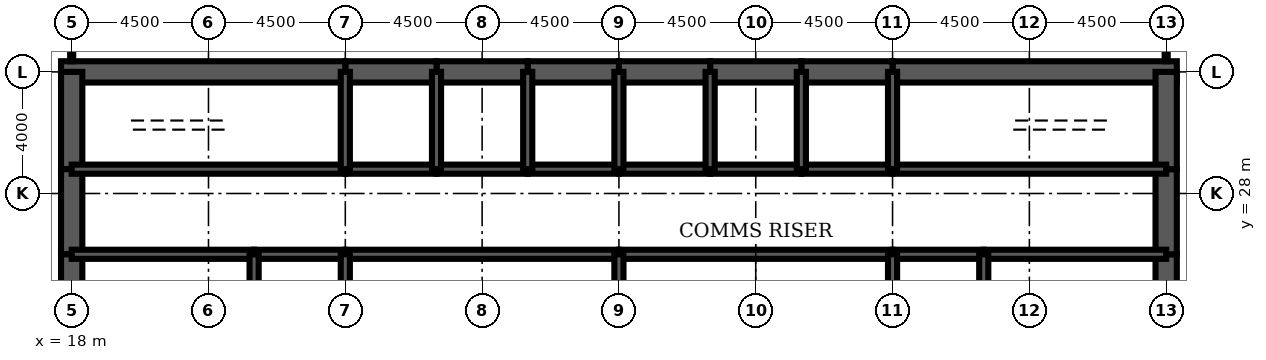
"""IFC4 building model, lengths in metres.
Left out: names, types, materials, properties, quantities, classifications, styles, units other than length and angle.
Written with IfcOpenShell. Run it as: python <this file> out.ifc"""

import sys

from ifc_helpers import new_model, si_unit, direction, frame, frame_2d, origin, place, context, subcontext, project, spatial, rectangle, extrude, element, fill, save


model = new_model("IFC4")
c1 = context("Model", 3, precision=1e-05, world=origin(), true_north=direction((0.0, 1.0)))
c2 = subcontext(c1, "Body", "Model", "MODEL_VIEW")
j1 = project(units=[si_unit("LENGTHUNIT", "METRE"), si_unit("PLANEANGLEUNIT", "RADIAN")], contexts=[c1])
p1 = place(None, origin())
s1 = spatial("IfcSite", under=j1, at=p1, CompositionType="ELEMENT")
p2 = place(p1, origin())
s2 = spatial("IfcBuilding", under=s1, at=p2, CompositionType="ELEMENT")
p3 = place(p2, frame((0.0, 0.0, 317.3)))
s3 = spatial("IfcBuildingStorey", under=s2, at=p3, CompositionType="ELEMENT", Elevation=317.3)
p4 = place(p3, frame((54.35, 32.0, 0.0), z_axis=(0.0, 0.0, 1.0), x_axis=(-1.0, 0.0, 0.0)))
e1 = element("IfcWall", 1, at=p4, inside=s3, PredefinedType="SHEAR", context=c2, shape_type="SweptSolid", body=[
    extrude(rectangle(XDim=9.35, YDim=0.7, at=frame_2d((4.675, 0.0))), origin(), (0.0, 0.0, 1.0), 4.2),
])
for number, where, z_axis, x_axis in (
    (2, (45.0, 32.0, 0.0), (0.0, 0.0, 1.0), (-1.0, 0.0, 0.0)),
    (3, (42.0, 32.0, 0.0), (0.0, 0.0, 1.0), (-1.0, 0.0, 0.0)),
    (4, (39.0, 32.0, 0.0), (0.0, 0.0, 1.0), (-1.0, 0.0, 0.0)),
    (5, (36.0, 32.0, 0.0), (0.0, 0.0, 1.0), (-1.0, 0.0, 0.0)),
    (6, (33.0, 32.0, 0.0), (0.0, 0.0, 1.0), (-1.0, 0.0, 0.0)),
    (7, (30.0, 32.0, 0.0), (0.0, 0.0, 1.0), (-1.0, 0.0, 0.0)),
):
    element("IfcWall", number, at=place(p3, frame(where, z_axis=z_axis, x_axis=x_axis)), inside=s3, PredefinedType="SHEAR", context=c2, shape_type="SweptSolid", body=[
        extrude(rectangle(XDim=3.0, YDim=0.7, at=frame_2d((1.5, 0.0))), origin(), (0.0, 0.0, 1.0), 4.2),
    ])
p5 = place(p3, frame((27.0, 32.0, 0.0), z_axis=(0.0, 0.0, 1.0), x_axis=(-1.0, 0.0, 0.0)))
e8 = element("IfcWall", 8, at=p5, inside=s3, PredefinedType="SHEAR", context=c2, shape_type="SweptSolid", body=[
    extrude(rectangle(XDim=9.35, YDim=0.7, at=frame_2d((4.675, 0.0))), origin(), (0.0, 0.0, 1.0), 4.2),
])
p6 = place(p3, frame((18.0, 32.0, 0.0), z_axis=(0.0, 0.0, 1.0), x_axis=(0.0, -1.0, 0.0)))
e9 = element("IfcWall", 9, at=p6, inside=s3, PredefinedType="SHEAR", context=c2, shape_type="SweptSolid", body=[
    extrude(rectangle(XDim=3.2, YDim=0.7, at=frame_2d((1.6, 0.0))), origin(), (0.0, 0.0, 1.0), 4.2),
])
p7 = place(p3, frame((18.0, 28.8, 0.0), z_axis=(0.0, 0.0, 1.0), x_axis=(0.0, -1.0, 0.0)))
e10 = element("IfcWall", 10, at=p7, inside=s3, PredefinedType="SHEAR", context=c2, shape_type="SweptSolid", body=[
    extrude(rectangle(XDim=2.8, YDim=0.7, at=frame_2d((1.4, 0.0))), origin(), (0.0, 0.0, 1.0), 4.2),
])
p8 = place(p7, frame((0.4, 0.0, 0.0)))
e11 = element("IfcOpeningElement", 11, at=p8, cuts=e10, PredefinedType="OPENING", context=c2, shape_type="SweptSolid", body=[
    extrude(rectangle(XDim=1.8, YDim=2.1, at=frame_2d((0.9, 1.05))), frame((0.0, 0.36, 0.0), z_axis=(0.0, -1.0, 0.0), x_axis=(1.0, 0.0, 0.0)), (0.0, 0.0, 1.0), 0.72),
])
for number, where, z_axis, x_axis in (
    (12, (18.0, 26.0, 0.0), (0.0, 0.0, 1.0), (0.0, -1.0, 0.0)),
    (13, (54.0, 22.0, 0.0), (0.0, 0.0, 1.0), (0.0, 1.0, 0.0)),
):
    element("IfcWall", number, at=place(p3, frame(where, z_axis=z_axis, x_axis=x_axis)), inside=s3, PredefinedType="SHEAR", context=c2, shape_type="SweptSolid", body=[
        extrude(rectangle(XDim=4.0, YDim=0.7, at=frame_2d((2.0, 0.0))), origin(), (0.0, 0.0, 1.0), 4.2),
    ])
p9 = place(p3, frame((54.0, 26.0, 0.0), z_axis=(0.0, 0.0, 1.0), x_axis=(0.0, 1.0, 0.0)))
e14 = element("IfcWall", 14, at=p9, inside=s3, PredefinedType="SHEAR", context=c2, shape_type="SweptSolid", body=[
    extrude(rectangle(XDim=2.8, YDim=0.7, at=frame_2d((1.4, 0.0))), origin(), (0.0, 0.0, 1.0), 4.2),
])
p10 = place(p9, frame((0.6, 0.0, 0.0)))
e15 = element("IfcOpeningElement", 15, at=p10, cuts=e14, PredefinedType="OPENING", context=c2, shape_type="SweptSolid", body=[
    extrude(rectangle(XDim=1.8, YDim=2.1, at=frame_2d((0.9, 1.05))), frame((0.0, 0.36, 0.0), z_axis=(0.0, -1.0, 0.0), x_axis=(1.0, 0.0, 0.0)), (0.0, 0.0, 1.0), 0.72),
])
p11 = place(p3, frame((54.0, 28.8, 0.0), z_axis=(0.0, 0.0, 1.0), x_axis=(0.0, 1.0, 0.0)))
e16 = element("IfcWall", 16, at=p11, inside=s3, PredefinedType="SHEAR", context=c2, shape_type="SweptSolid", body=[
    extrude(rectangle(XDim=3.2, YDim=0.7, at=frame_2d((1.6, 0.0))), origin(), (0.0, 0.0, 1.0), 4.2),
])
p12 = place(p3, frame((18.0, 28.8, 0.0), z_axis=(0.0, 0.0, 1.0), x_axis=(1.0, 0.0, 0.0)))
e17 = element("IfcWall", 17, at=p12, inside=s3, PredefinedType="SOLIDWALL", context=c2, shape_type="SweptSolid", body=[
    extrude(rectangle(XDim=9.0, YDim=0.3, at=frame_2d((4.5, 0.0))), origin(), (0.0, 0.0, 1.0), 4.2),
])
p13 = place(p12, frame((0.65, 0.0, 0.0)))
e18 = element("IfcOpeningElement", 18, at=p13, cuts=e17, PredefinedType="OPENING", context=c2, shape_type="SweptSolid", body=[
    extrude(rectangle(XDim=1.0, YDim=2.1, at=frame_2d((0.5, 1.05))), frame((0.0, 0.16, 0.0), z_axis=(0.0, -1.0, 0.0), x_axis=(1.0, 0.0, 0.0)), (0.0, 0.0, 1.0), 0.32),
])
p14 = place(p3, frame((27.0, 28.8, 0.0), z_axis=(0.0, 0.0, 1.0), x_axis=(1.0, 0.0, 0.0)))
e19 = element("IfcWall", 19, at=p14, inside=s3, PredefinedType="SOLIDWALL", context=c2, shape_type="SweptSolid", body=[
    extrude(rectangle(XDim=3.0, YDim=0.3, at=frame_2d((1.5, 0.0))), origin(), (0.0, 0.0, 1.0), 4.2),
])
p15 = place(p14, frame((0.95, 0.0, 0.0)))
e20 = element("IfcOpeningElement", 20, at=p15, cuts=e19, PredefinedType="OPENING", context=c2, shape_type="SweptSolid", body=[
    extrude(rectangle(XDim=1.1, YDim=2.2, at=frame_2d((0.55, 1.1))), frame((0.0, 0.16, 0.0), z_axis=(0.0, -1.0, 0.0), x_axis=(1.0, 0.0, 0.0)), (0.0, 0.0, 1.0), 0.32),
])
p16 = place(p3, frame((30.0, 28.8, 0.0), z_axis=(0.0, 0.0, 1.0), x_axis=(1.0, 0.0, 0.0)))
e21 = element("IfcWall", 21, at=p16, inside=s3, PredefinedType="SOLIDWALL", context=c2, shape_type="SweptSolid", body=[
    extrude(rectangle(XDim=3.0, YDim=0.3, at=frame_2d((1.5, 0.0))), origin(), (0.0, 0.0, 1.0), 4.2),
])
p17 = place(p16, frame((0.95, 0.0, 0.0)))
e22 = element("IfcOpeningElement", 22, at=p17, cuts=e21, PredefinedType="OPENING", context=c2, shape_type="SweptSolid", body=[
    extrude(rectangle(XDim=1.1, YDim=2.2, at=frame_2d((0.55, 1.1))), frame((0.0, 0.16, 0.0), z_axis=(0.0, -1.0, 0.0), x_axis=(1.0, 0.0, 0.0)), (0.0, 0.0, 1.0), 0.32),
])
p18 = place(p3, frame((33.0, 28.8, 0.0), z_axis=(0.0, 0.0, 1.0), x_axis=(1.0, 0.0, 0.0)))
e23 = element("IfcWall", 23, at=p18, inside=s3, PredefinedType="SOLIDWALL", context=c2, shape_type="SweptSolid", body=[
    extrude(rectangle(XDim=3.0, YDim=0.3, at=frame_2d((1.5, 0.0))), origin(), (0.0, 0.0, 1.0), 4.2),
])
p19 = place(p18, frame((0.95, 0.0, 0.0)))
e24 = element("IfcOpeningElement", 24, at=p19, cuts=e23, PredefinedType="OPENING", context=c2, shape_type="SweptSolid", body=[
    extrude(rectangle(XDim=1.1, YDim=2.2, at=frame_2d((0.55, 1.1))), frame((0.0, 0.16, 0.0), z_axis=(0.0, -1.0, 0.0), x_axis=(1.0, 0.0, 0.0)), (0.0, 0.0, 1.0), 0.32),
])
p20 = place(p3, frame((36.0, 28.8, 0.0), z_axis=(0.0, 0.0, 1.0), x_axis=(1.0, 0.0, 0.0)))
e25 = element("IfcWall", 25, at=p20, inside=s3, PredefinedType="SOLIDWALL", context=c2, shape_type="SweptSolid", body=[
    extrude(rectangle(XDim=3.0, YDim=0.3, at=frame_2d((1.5, 0.0))), origin(), (0.0, 0.0, 1.0), 4.2),
])
p21 = place(p20, frame((1.0, 0.0, 0.0)))
e26 = element("IfcOpeningElement", 26, at=p21, cuts=e25, PredefinedType="OPENING", context=c2, shape_type="SweptSolid", body=[
    extrude(rectangle(XDim=1.0, YDim=2.1, at=frame_2d((0.5, 1.05))), frame((0.0, 0.16, 0.0), z_axis=(0.0, -1.0, 0.0), x_axis=(1.0, 0.0, 0.0)), (0.0, 0.0, 1.0), 0.32),
])
p22 = place(p3, frame((39.0, 28.8, 0.0), z_axis=(0.0, 0.0, 1.0), x_axis=(1.0, 0.0, 0.0)))
e27 = element("IfcWall", 27, at=p22, inside=s3, PredefinedType="SOLIDWALL", context=c2, shape_type="SweptSolid", body=[
    extrude(rectangle(XDim=3.0, YDim=0.3, at=frame_2d((1.5, 0.0))), origin(), (0.0, 0.0, 1.0), 4.2),
])
p23 = place(p22, frame((1.0, 0.0, 0.0)))
e28 = element("IfcOpeningElement", 28, at=p23, cuts=e27, PredefinedType="OPENING", context=c2, shape_type="SweptSolid", body=[
    extrude(rectangle(XDim=1.0, YDim=2.1, at=frame_2d((0.5, 1.05))), frame((0.0, 0.16, 0.0), z_axis=(0.0, -1.0, 0.0), x_axis=(1.0, 0.0, 0.0)), (0.0, 0.0, 1.0), 0.32),
])
p24 = place(p3, frame((42.0, 28.8, 0.0), z_axis=(0.0, 0.0, 1.0), x_axis=(1.0, 0.0, 0.0)))
e29 = element("IfcWall", 29, at=p24, inside=s3, PredefinedType="SOLIDWALL", context=c2, shape_type="SweptSolid", body=[
    extrude(rectangle(XDim=3.0, YDim=0.3, at=frame_2d((1.5, 0.0))), origin(), (0.0, 0.0, 1.0), 4.2),
])
p25 = place(p24, frame((0.95, 0.0, 0.0)))
e30 = element("IfcOpeningElement", 30, at=p25, cuts=e29, PredefinedType="OPENING", context=c2, shape_type="SweptSolid", body=[
    extrude(rectangle(XDim=1.1, YDim=2.2, at=frame_2d((0.55, 1.1))), frame((0.0, 0.16, 0.0), z_axis=(0.0, -1.0, 0.0), x_axis=(1.0, 0.0, 0.0)), (0.0, 0.0, 1.0), 0.32),
])
p26 = place(p3, frame((45.0, 28.8, 0.0), z_axis=(0.0, 0.0, 1.0), x_axis=(1.0, 0.0, 0.0)))
e31 = element("IfcWall", 31, at=p26, inside=s3, PredefinedType="SOLIDWALL", context=c2, shape_type="SweptSolid", body=[
    extrude(rectangle(XDim=9.0, YDim=0.3, at=frame_2d((4.5, 0.0))), origin(), (0.0, 0.0, 1.0), 4.2),
])
p27 = place(p26, frame((7.35, 0.0, 0.0)))
e32 = element("IfcOpeningElement", 32, at=p27, cuts=e31, PredefinedType="OPENING", context=c2, shape_type="SweptSolid", body=[
    extrude(rectangle(XDim=1.0, YDim=2.1, at=frame_2d((0.5, 1.05))), frame((0.0, 0.16, 0.0), z_axis=(0.0, -1.0, 0.0), x_axis=(1.0, 0.0, 0.0)), (0.0, 0.0, 1.0), 0.32),
])
p28 = place(p3, frame((18.0, 26.0, 0.0), z_axis=(0.0, 0.0, 1.0), x_axis=(1.0, 0.0, 0.0)))
e33 = element("IfcWall", 33, at=p28, inside=s3, PredefinedType="SOLIDWALL", context=c2, shape_type="SweptSolid", body=[
    extrude(rectangle(XDim=6.0, YDim=0.3, at=frame_2d((3.0, 0.0))), origin(), (0.0, 0.0, 1.0), 4.2),
])
p29 = place(p3, frame((24.0, 26.0, 0.0), z_axis=(0.0, 0.0, 1.0), x_axis=(1.0, 0.0, 0.0)))
e34 = element("IfcWall", 34, at=p29, inside=s3, PredefinedType="SOLIDWALL", context=c2, shape_type="SweptSolid", body=[
    extrude(rectangle(XDim=3.0, YDim=0.3, at=frame_2d((1.5, 0.0))), origin(), (0.0, 0.0, 1.0), 4.2),
])
for number, where, z_axis, x_axis in (
    (35, (27.0, 26.0, 0.0), (0.0, 0.0, 1.0), (1.0, 0.0, 0.0)),
    (36, (36.0, 26.0, 0.0), (0.0, 0.0, 1.0), (1.0, 0.0, 0.0)),
):
    element("IfcWall", number, at=place(p3, frame(where, z_axis=z_axis, x_axis=x_axis)), inside=s3, PredefinedType="SOLIDWALL", context=c2, shape_type="SweptSolid", body=[
        extrude(rectangle(XDim=9.0, YDim=0.3, at=frame_2d((4.5, 0.0))), origin(), (0.0, 0.0, 1.0), 4.2),
    ])
p30 = place(p3, frame((45.0, 26.0, 0.0), z_axis=(0.0, 0.0, 1.0), x_axis=(1.0, 0.0, 0.0)))
e37 = element("IfcWall", 37, at=p30, inside=s3, PredefinedType="SOLIDWALL", context=c2, shape_type="SweptSolid", body=[
    extrude(rectangle(XDim=3.0, YDim=0.3, at=frame_2d((1.5, 0.0))), origin(), (0.0, 0.0, 1.0), 4.2),
])
p31 = place(p3, frame((48.0, 26.0, 0.0), z_axis=(0.0, 0.0, 1.0), x_axis=(1.0, 0.0, 0.0)))
e38 = element("IfcWall", 38, at=p31, inside=s3, PredefinedType="SOLIDWALL", context=c2, shape_type="SweptSolid", body=[
    extrude(rectangle(XDim=6.0, YDim=0.3, at=frame_2d((3.0, 0.0))), origin(), (0.0, 0.0, 1.0), 4.2),
])
for number, where, z_axis, x_axis in (
    (39, (27.0, 28.8, 0.0), (0.0, 0.0, 1.0), (0.0, 1.0, 0.0)),
    (40, (30.0, 28.8, 0.0), (0.0, 0.0, 1.0), (0.0, 1.0, 0.0)),
    (41, (33.0, 28.8, 0.0), (0.0, 0.0, 1.0), (0.0, 1.0, 0.0)),
    (42, (36.0, 28.8, 0.0), (0.0, 0.0, 1.0), (0.0, 1.0, 0.0)),
    (43, (39.0, 28.8, 0.0), (0.0, 0.0, 1.0), (0.0, 1.0, 0.0)),
    (44, (42.0, 28.8, 0.0), (0.0, 0.0, 1.0), (0.0, 1.0, 0.0)),
    (45, (45.0, 28.8, 0.0), (0.0, 0.0, 1.0), (0.0, 1.0, 0.0)),
):
    element("IfcWall", number, at=place(p3, frame(where, z_axis=z_axis, x_axis=x_axis)), inside=s3, PredefinedType="SOLIDWALL", context=c2, shape_type="SweptSolid", body=[
        extrude(rectangle(XDim=3.2, YDim=0.3, at=frame_2d((1.6, 0.0))), origin(), (0.0, 0.0, 1.0), 4.2),
    ])
for number, where, z_axis, x_axis in (
    (46, (24.0, 22.0, 0.0), (0.0, 0.0, 1.0), (0.0, 1.0, 0.0)),
    (47, (27.0, 22.0, 0.0), (0.0, 0.0, 1.0), (0.0, 1.0, 0.0)),
    (48, (36.0, 22.0, 0.0), (0.0, 0.0, 1.0), (0.0, 1.0, 0.0)),
    (49, (45.0, 22.0, 0.0), (0.0, 0.0, 1.0), (0.0, 1.0, 0.0)),
    (50, (48.0, 22.0, 0.0), (0.0, 0.0, 1.0), (0.0, 1.0, 0.0)),
):
    element("IfcWall", number, at=place(p3, frame(where, z_axis=z_axis, x_axis=x_axis)), inside=s3, PredefinedType="SOLIDWALL", context=c2, shape_type="SweptSolid", body=[
        extrude(rectangle(XDim=4.0, YDim=0.3, at=frame_2d((2.0, 0.0))), origin(), (0.0, 0.0, 1.0), 4.2),
    ])
p32 = place(p3, frame((39.0, 22.15, 0.0), z_axis=(0.0, 0.0, 1.0), x_axis=(0.0, 1.0, 0.0)))
e51 = element("IfcWall", 51, at=p32, inside=s3, PredefinedType="PARTITIONING", context=c2, shape_type="SweptSolid", body=[
    extrude(rectangle(XDim=3.7, YDim=0.15, at=frame_2d((1.85, 0.0))), origin(), (0.0, 0.0, 1.0), 3.0),
])
p33 = place(p32, frame((2.2, 0.0, 0.0)))
e52 = element("IfcOpeningElement", 52, at=p33, cuts=e51, PredefinedType="OPENING", context=c2, shape_type="SweptSolid", body=[
    extrude(rectangle(XDim=1.0, YDim=2.1, at=frame_2d((0.5, 1.05))), frame((0.0, 0.085, 0.0), z_axis=(0.0, -1.0, 0.0), x_axis=(1.0, 0.0, 0.0)), (0.0, 0.0, 1.0), 0.17),
])
for number, where, z_axis, x_axis in (
    (53, (20.525, 22.15, 0.0), (0.0, 0.0, 1.0), (0.0, 1.0, 0.0)),
    (54, (51.475, 22.15, 0.0), (0.0, 0.0, 1.0), (0.0, 1.0, 0.0)),
):
    element("IfcWall", number, at=place(p3, frame(where, z_axis=z_axis, x_axis=x_axis)), inside=s3, PredefinedType="PARTITIONING", context=c2, shape_type="SweptSolid", body=[
        extrude(rectangle(XDim=3.7, YDim=0.15, at=frame_2d((1.85, 0.0))), origin(), (0.0, 0.0, 1.0), 3.0),
    ])
p34 = place(p3, frame((18.0, 32.35, 0.0), z_axis=(0.0, 0.0, 1.0), x_axis=(0.0, 1.0, 0.0)))
e55 = element("IfcWall", 55, at=p34, inside=s3, PredefinedType="PARTITIONING", context=c2, shape_type="SweptSolid", body=[
    extrude(rectangle(XDim=6.7, YDim=0.1, at=frame_2d((3.35, 0.0))), origin(), (0.0, 0.0, 1.0), 3.0),
])
p35 = place(p34, frame((2.55, 0.0, 0.0)))
e56 = element("IfcOpeningElement", 56, at=p35, cuts=e55, PredefinedType="OPENING", context=c2, shape_type="SweptSolid", body=[
    extrude(rectangle(XDim=1.6, YDim=2.1, at=frame_2d((0.8, 1.05))), frame((0.0, 0.06, 0.0), z_axis=(0.0, -1.0, 0.0), x_axis=(1.0, 0.0, 0.0)), (0.0, 0.0, 1.0), 0.12),
])
p36 = place(p3, frame((54.0, 32.35, 0.0), z_axis=(0.0, 0.0, 1.0), x_axis=(0.0, 1.0, 0.0)))
e57 = element("IfcWall", 57, at=p36, inside=s3, PredefinedType="PARTITIONING", context=c2, shape_type="SweptSolid", body=[
    extrude(rectangle(XDim=11.2, YDim=0.1, at=frame_2d((5.6, 0.0))), origin(), (0.0, 0.0, 1.0), 3.0),
])
p37 = place(p36, frame((2.3, 0.0, 0.0)))
e58 = element("IfcOpeningElement", 58, at=p37, cuts=e57, PredefinedType="OPENING", context=c2, shape_type="SweptSolid", body=[
    extrude(rectangle(XDim=1.6, YDim=2.1, at=frame_2d((0.8, 1.05))), frame((0.0, 0.06, 0.0), z_axis=(0.0, -1.0, 0.0), x_axis=(1.0, 0.0, 0.0)), (0.0, 0.0, 1.0), 0.12),
])
p38 = place(p33, origin())
e59 = element("IfcDoor", 59, at=p38, inside=s3, OperationType="SINGLE_SWING_RIGHT", PredefinedType="DOOR", context=c2, shape_type="SweptSolid", body=[
    extrude(rectangle(XDim=1.0, YDim=2.1, at=frame_2d((0.5, 1.05))), frame((0.0, 0.025, 0.0), z_axis=(0.0, -1.0, 0.0), x_axis=(1.0, 0.0, 0.0)), (0.0, 0.0, 1.0), 0.05),
])
fill(e52, e59)
p39 = place(p25, origin())
e60 = element("IfcDoor", 60, at=p39, inside=s3, OperationType="DOUBLE_DOOR_SLIDING", PredefinedType="USERDEFINED", context=c2, shape_type="SweptSolid", body=[
    extrude(rectangle(XDim=1.1, YDim=2.2, at=frame_2d((0.55, 1.1))), frame((0.0, 0.025, 0.0), z_axis=(0.0, -1.0, 0.0), x_axis=(1.0, 0.0, 0.0)), (0.0, 0.0, 1.0), 0.05),
])
fill(e30, e60)
p40 = place(p15, origin())
e61 = element("IfcDoor", 61, at=p40, inside=s3, OperationType="DOUBLE_DOOR_SLIDING", PredefinedType="USERDEFINED", context=c2, shape_type="SweptSolid", body=[
    extrude(rectangle(XDim=1.1, YDim=2.2, at=frame_2d((0.55, 1.1))), frame((0.0, 0.025, 0.0), z_axis=(0.0, -1.0, 0.0), x_axis=(1.0, 0.0, 0.0)), (0.0, 0.0, 1.0), 0.05),
])
fill(e20, e61)
p41 = place(p17, origin())
e62 = element("IfcDoor", 62, at=p41, inside=s3, OperationType="DOUBLE_DOOR_SLIDING", PredefinedType="USERDEFINED", context=c2, shape_type="SweptSolid", body=[
    extrude(rectangle(XDim=1.1, YDim=2.2, at=frame_2d((0.55, 1.1))), frame((0.0, 0.025, 0.0), z_axis=(0.0, -1.0, 0.0), x_axis=(1.0, 0.0, 0.0)), (0.0, 0.0, 1.0), 0.05),
])
fill(e22, e62)
p42 = place(p19, origin())
e63 = element("IfcDoor", 63, at=p42, inside=s3, OperationType="DOUBLE_DOOR_SLIDING", PredefinedType="USERDEFINED", context=c2, shape_type="SweptSolid", body=[
    extrude(rectangle(XDim=1.1, YDim=2.2, at=frame_2d((0.55, 1.1))), frame((0.0, 0.025, 0.0), z_axis=(0.0, -1.0, 0.0), x_axis=(1.0, 0.0, 0.0)), (0.0, 0.0, 1.0), 0.05),
])
fill(e24, e63)
p43 = place(p13, origin())
e64 = element("IfcDoor", 64, at=p43, inside=s3, OperationType="SINGLE_SWING_LEFT", PredefinedType="DOOR", context=c2, shape_type="SweptSolid", body=[
    extrude(rectangle(XDim=1.0, YDim=2.1, at=frame_2d((0.5, 1.05))), frame((0.0, 0.025, 0.0), z_axis=(0.0, -1.0, 0.0), x_axis=(1.0, 0.0, 0.0)), (0.0, 0.0, 1.0), 0.05),
])
fill(e18, e64)
p44 = place(p27, origin())
e65 = element("IfcDoor", 65, at=p44, inside=s3, OperationType="SINGLE_SWING_RIGHT", PredefinedType="DOOR", context=c2, shape_type="SweptSolid", body=[
    extrude(rectangle(XDim=1.0, YDim=2.1, at=frame_2d((0.5, 1.05))), frame((0.0, 0.025, 0.0), z_axis=(0.0, -1.0, 0.0), x_axis=(1.0, 0.0, 0.0)), (0.0, 0.0, 1.0), 0.05),
])
fill(e32, e65)
p45 = place(p8, origin())
e66 = element("IfcDoor", 66, at=p45, inside=s3, OperationType="SINGLE_SWING_LEFT", PredefinedType="DOOR", context=c2, shape_type="SweptSolid", body=[
    extrude(rectangle(XDim=1.8, YDim=2.1, at=frame_2d((0.9, 1.05))), frame((0.0, 0.35, 0.0), z_axis=(0.0, -1.0, 0.0), x_axis=(1.0, 0.0, 0.0)), (0.0, 0.0, 1.0), 0.699),
])
fill(e11, e66)
p46 = place(p10, origin())
e67 = element("IfcDoor", 67, at=p46, inside=s3, OperationType="SINGLE_SWING_LEFT", PredefinedType="DOOR", context=c2, shape_type="SweptSolid", body=[
    extrude(rectangle(XDim=1.8, YDim=2.1, at=frame_2d((0.9, 1.05))), frame((0.0, 0.35, 0.0), z_axis=(0.0, -1.0, 0.0), x_axis=(1.0, 0.0, 0.0)), (0.0, 0.0, 1.0), 0.699),
])
fill(e15, e67)
p47 = place(p21, origin())
e68 = element("IfcDoor", 68, at=p47, inside=s3, OperationType="SINGLE_SWING_LEFT", PredefinedType="DOOR", context=c2, shape_type="SweptSolid", body=[
    extrude(rectangle(XDim=1.0, YDim=2.1, at=frame_2d((0.5, 1.05))), frame((0.0, 0.025, 0.0), z_axis=(0.0, -1.0, 0.0), x_axis=(1.0, 0.0, 0.0)), (0.0, 0.0, 1.0), 0.05),
])
fill(e26, e68)
p48 = place(p23, origin())
e69 = element("IfcDoor", 69, at=p48, inside=s3, OperationType="SINGLE_SWING_LEFT", PredefinedType="DOOR", context=c2, shape_type="SweptSolid", body=[
    extrude(rectangle(XDim=1.0, YDim=2.1, at=frame_2d((0.5, 1.05))), frame((0.0, 0.025, 0.0), z_axis=(0.0, -1.0, 0.0), x_axis=(1.0, 0.0, 0.0)), (0.0, 0.0, 1.0), 0.05),
])
fill(e28, e69)
save(model, sys.argv[1])
